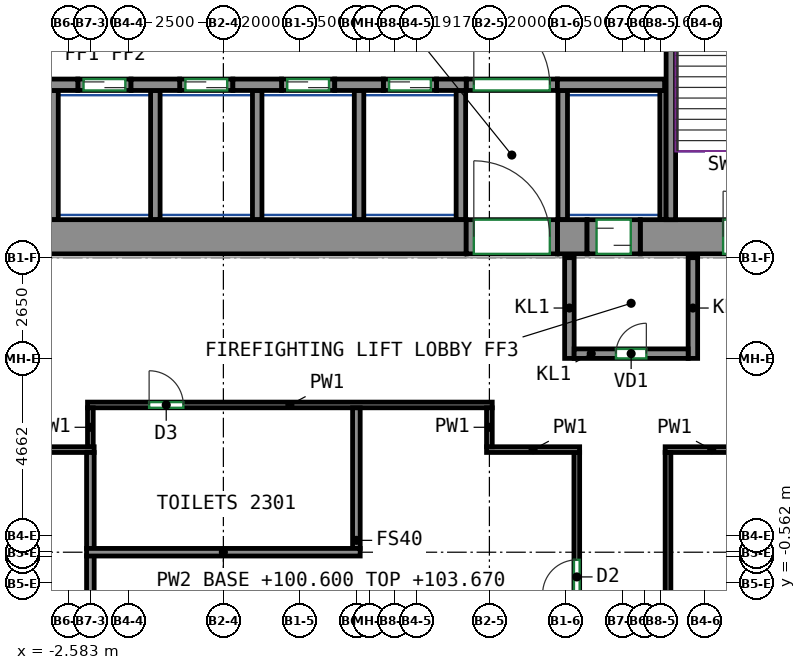
"""IFC4 building model, lengths in metres.
Left out: names, types, materials, properties, quantities, classifications, styles, units other than length and angle.
Written with IfcOpenShell. Run it as: python <this file> out.ifc"""

import sys

from ifc_helpers import new_model, si_unit, direction, frame, frame_2d, origin, place, context, subcontext, project, spatial, rectangle, extrude, source, transform, mapped, element, fill, save


model = new_model("IFC4")
c1 = context("Model", 3, precision=1e-05, world=origin(), true_north=direction((0.0, 1.0)))
c2 = subcontext(c1, "Body", "Model", "MODEL_VIEW")
j1 = project(units=[si_unit("LENGTHUNIT", "METRE"), si_unit("PLANEANGLEUNIT", "RADIAN")], contexts=[c1])
p1 = place(None, origin())
s1 = spatial("IfcSite", under=j1, at=p1, CompositionType="ELEMENT")
p2 = place(p1, origin())
s2 = spatial("IfcBuilding", under=s1, at=p2, CompositionType="ELEMENT")
p3 = place(p2, frame((0.0, 0.0, 100.6)))
s3 = spatial("IfcBuildingStorey", under=s2, at=p3, CompositionType="ELEMENT", Elevation=100.6)
m1 = source(origin(), c2, "Body", "SweptSolid", [
    extrude(rectangle(XDim=14.18, YDim=0.9, at=frame_2d((7.09, 0.0))), origin(), (0.0, 0.0, 1.0), 3.72),
])
p4 = place(p3, frame((-6.29, 8.55, 0.0), z_axis=(0.0, 0.0, 1.0), x_axis=(1.0, 0.0, 0.0)))
e1 = element("IfcWall", 1, at=p4, inside=s3, PredefinedType="SHEAR", context=c2, shape_type="MappedRepresentation", body=[
    mapped(m1, transform((0.0, 0.0, 0.0))),
])
m2 = source(origin(), c2, "Body", "SweptSolid", [
    extrude(rectangle(XDim=0.78, YDim=0.9, at=frame_2d((0.39, 0.0))), origin(), (0.0, 0.0, 1.0), 3.72),
])
p5 = place(p3, frame((10.29, 8.55, 0.0), z_axis=(0.0, 0.0, 1.0), x_axis=(1.0, 0.0, 0.0)))
e2 = element("IfcWall", 2, at=p5, inside=s3, PredefinedType="SHEAR", context=c2, shape_type="MappedRepresentation", body=[
    mapped(m2, transform((0.0, 0.0, 0.0))),
])
m3 = source(origin(), c2, "Body", "SweptSolid", [
    extrude(rectangle(XDim=5.53, YDim=0.9, at=frame_2d((2.765, 0.0))), origin(), (0.0, 0.0, 1.0), 3.72),
])
p6 = place(p3, frame((12.47, 8.55, 0.0), z_axis=(0.0, 0.0, 1.0), x_axis=(1.0, 0.0, 0.0)))
e3 = element("IfcWall", 3, at=p6, inside=s3, PredefinedType="SHEAR", context=c2, shape_type="MappedRepresentation", body=[
    mapped(m3, transform((0.0, 0.0, 0.0))),
])
p7 = place(p6, frame((2.18, 0.0, 0.0)))
e4 = element("IfcOpeningElement", 4, at=p7, cuts=e3, PredefinedType="OPENING", context=c2, shape_type="SweptSolid", body=[
    extrude(rectangle(XDim=1.2, YDim=2.1, at=frame_2d((0.6, 1.05))), frame((0.0, 0.46, 0.0), z_axis=(0.0, -1.0, 0.0), x_axis=(1.0, 0.0, 0.0)), (0.0, 0.0, 1.0), 0.92),
])
m4 = source(origin(), c2, "Body", "SweptSolid", [
    extrude(rectangle(XDim=7.75, YDim=0.25, at=frame_2d((3.875, 0.0))), origin(), (0.0, 0.0, 1.0), 3.72),
])
p8 = place(p3, frame((13.275, 9.0, 0.0), z_axis=(0.0, 0.0, 1.0), x_axis=(0.0, 1.0, 0.0)))
e5 = element("IfcWall", 5, at=p8, inside=s3, PredefinedType="SHEAR", context=c2, shape_type="MappedRepresentation", body=[
    mapped(m4, transform((0.0, 0.0, 0.0))),
])
m5 = source(origin(), c2, "Body", "SweptSolid", [
    extrude(rectangle(XDim=1.28, YDim=0.3, at=frame_2d((0.64, 0.0))), origin(), (0.0, 0.0, 1.0), 3.72),
])
for number, where, z_axis, x_axis in (
    (6, (-3.61, 12.55, 0.0), (0.0, 0.0, 1.0), (1.0, 0.0, 0.0)),
    (7, (-0.93, 12.55, 0.0), (0.0, 0.0, 1.0), (1.0, 0.0, 0.0)),
    (8, (1.75, 12.55, 0.0), (0.0, 0.0, 1.0), (1.0, 0.0, 0.0)),
    (9, (4.43, 12.55, 0.0), (0.0, 0.0, 1.0), (1.0, 0.0, 0.0)),
):
    element("IfcWall", number, at=place(p3, frame(where, z_axis=z_axis, x_axis=x_axis)), inside=s3, PredefinedType="SHEAR", context=c2, shape_type="MappedRepresentation", body=[
        mapped(m5, transform((0.0, 0.0, 0.0))),
    ])
m6 = source(origin(), c2, "Body", "SweptSolid", [
    extrude(rectangle(XDim=0.78, YDim=0.3, at=frame_2d((0.39, 0.0))), origin(), (0.0, 0.0, 1.0), 3.72),
])
p9 = place(p3, frame((7.11, 12.55, 0.0), z_axis=(0.0, 0.0, 1.0), x_axis=(1.0, 0.0, 0.0)))
e10 = element("IfcWall", 10, at=p9, inside=s3, PredefinedType="SHEAR", context=c2, shape_type="MappedRepresentation", body=[
    mapped(m6, transform((0.0, 0.0, 0.0))),
])
m7 = source(origin(), c2, "Body", "SweptSolid", [
    extrude(rectangle(XDim=2.82, YDim=0.3, at=frame_2d((1.41, 0.0))), origin(), (0.0, 0.0, 1.0), 3.72),
])
p10 = place(p3, frame((10.29, 12.55, 0.0), z_axis=(0.0, 0.0, 1.0), x_axis=(1.0, 0.0, 0.0)))
e11 = element("IfcWall", 11, at=p10, inside=s3, PredefinedType="SHEAR", context=c2, shape_type="MappedRepresentation", body=[
    mapped(m7, transform((0.0, 0.0, 0.0))),
])
m8 = source(origin(), c2, "Body", "SweptSolid", [
    extrude(rectangle(XDim=1.4, YDim=0.3, at=frame_2d((0.7, 0.0))), origin(), (0.0, 0.0, 1.0), 3.72),
])
p11 = place(p3, frame((-2.33, 12.55, 0.0), z_axis=(0.0, 0.0, 1.0), x_axis=(1.0, 0.0, 0.0)))
e12 = element("IfcWall", 12, at=p11, inside=s3, PredefinedType="PARTITIONING", context=c2, shape_type="MappedRepresentation", body=[
    mapped(m8, transform((0.0, 0.0, 0.0))),
])
p12 = place(p11, frame((0.15, 0.0, 0.0)))
e13 = element("IfcOpeningElement", 13, at=p12, cuts=e12, PredefinedType="OPENING", context=c2, shape_type="SweptSolid", body=[
    extrude(rectangle(XDim=1.1, YDim=2.1, at=frame_2d((0.55, 1.05))), frame((0.0, 0.16, 0.0), z_axis=(0.0, -1.0, 0.0), x_axis=(1.0, 0.0, 0.0)), (0.0, 0.0, 1.0), 0.32),
])
m9 = source(origin(), c2, "Body", "SweptSolid", [
    extrude(rectangle(XDim=1.4, YDim=0.3, at=frame_2d((0.7, 0.0))), origin(), (0.0, 0.0, 1.0), 3.72),
])
p13 = place(p3, frame((0.35, 12.55, 0.0), z_axis=(0.0, 0.0, 1.0), x_axis=(1.0, 0.0, 0.0)))
e14 = element("IfcWall", 14, at=p13, inside=s3, PredefinedType="PARTITIONING", context=c2, shape_type="MappedRepresentation", body=[
    mapped(m9, transform((0.0, 0.0, 0.0))),
])
p14 = place(p13, frame((0.15, 0.0, 0.0)))
e15 = element("IfcOpeningElement", 15, at=p14, cuts=e14, PredefinedType="OPENING", context=c2, shape_type="SweptSolid", body=[
    extrude(rectangle(XDim=1.1, YDim=2.1, at=frame_2d((0.55, 1.05))), frame((0.0, 0.16, 0.0), z_axis=(0.0, -1.0, 0.0), x_axis=(1.0, 0.0, 0.0)), (0.0, 0.0, 1.0), 0.32),
])
p15 = place(p3, frame((3.03, 12.55, 0.0), z_axis=(0.0, 0.0, 1.0), x_axis=(1.0, 0.0, 0.0)))
e16 = element("IfcWall", 16, at=p15, inside=s3, PredefinedType="PARTITIONING", context=c2, shape_type="MappedRepresentation", body=[
    mapped(m9, transform((0.0, 0.0, 0.0))),
])
p16 = place(p15, frame((0.15, 0.0, 0.0)))
e17 = element("IfcOpeningElement", 17, at=p16, cuts=e16, PredefinedType="OPENING", context=c2, shape_type="SweptSolid", body=[
    extrude(rectangle(XDim=1.1, YDim=2.1, at=frame_2d((0.55, 1.05))), frame((0.0, 0.16, 0.0), z_axis=(0.0, -1.0, 0.0), x_axis=(1.0, 0.0, 0.0)), (0.0, 0.0, 1.0), 0.32),
])
p17 = place(p3, frame((5.71, 12.55, 0.0), z_axis=(0.0, 0.0, 1.0), x_axis=(1.0, 0.0, 0.0)))
e18 = element("IfcWall", 18, at=p17, inside=s3, PredefinedType="PARTITIONING", context=c2, shape_type="MappedRepresentation", body=[
    mapped(m8, transform((0.0, 0.0, 0.0))),
])
p18 = place(p17, frame((0.15, 0.0, 0.0)))
e19 = element("IfcOpeningElement", 19, at=p18, cuts=e18, PredefinedType="OPENING", context=c2, shape_type="SweptSolid", body=[
    extrude(rectangle(XDim=1.1, YDim=2.1, at=frame_2d((0.55, 1.05))), frame((0.0, 0.16, 0.0), z_axis=(0.0, -1.0, 0.0), x_axis=(1.0, 0.0, 0.0)), (0.0, 0.0, 1.0), 0.32),
])
m10 = source(origin(), c2, "Body", "SweptSolid", [
    extrude(rectangle(XDim=2.4, YDim=0.3, at=frame_2d((1.2, 0.0))), origin(), (0.0, 0.0, 1.0), 3.72),
])
p19 = place(p3, frame((7.89, 12.55, 0.0), z_axis=(0.0, 0.0, 1.0), x_axis=(1.0, 0.0, 0.0)))
e20 = element("IfcWall", 20, at=p19, inside=s3, PredefinedType="PARTITIONING", context=c2, shape_type="MappedRepresentation", body=[
    mapped(m10, transform((0.0, 0.0, 0.0))),
])
p20 = place(p19, frame((0.2, 0.0, 0.0)))
e21 = element("IfcOpeningElement", 21, at=p20, cuts=e20, PredefinedType="OPENING", context=c2, shape_type="SweptSolid", body=[
    extrude(rectangle(XDim=2.0, YDim=2.1, at=frame_2d((1.0, 1.05))), frame((0.0, 0.16, 0.0), z_axis=(0.0, -1.0, 0.0), x_axis=(1.0, 0.0, 0.0)), (0.0, 0.0, 1.0), 0.32),
])
m11 = source(origin(), c2, "Body", "SweptSolid", [
    extrude(rectangle(XDim=2.65, YDim=0.25, at=frame_2d((1.325, 0.0))), origin(), (0.0, 0.0, 1.0), 3.72),
])
for number, where, z_axis, x_axis in (
    (22, (10.605, 5.35, 0.0), (0.0, 0.0, 1.0), (0.0, 1.0, 0.0)),
    (23, (13.855, 5.35, 0.0), (0.0, 0.0, 1.0), (0.0, 1.0, 0.0)),
):
    element("IfcWall", number, at=place(p3, frame(where, z_axis=z_axis, x_axis=x_axis)), inside=s3, PredefinedType="PARTITIONING", context=c2, shape_type="MappedRepresentation", body=[
        mapped(m11, transform((0.0, 0.0, 0.0))),
    ])
m12 = source(origin(), c2, "Body", "SweptSolid", [
    extrude(rectangle(XDim=3.0, YDim=0.25, at=frame_2d((1.5, 0.0))), origin(), (0.0, 0.0, 1.0), 3.72),
])
p21 = place(p3, frame((10.73, 5.475, 0.0), z_axis=(0.0, 0.0, 1.0), x_axis=(1.0, 0.0, 0.0)))
e24 = element("IfcWall", 24, at=p21, inside=s3, PredefinedType="PARTITIONING", context=c2, shape_type="MappedRepresentation", body=[
    mapped(m12, transform((0.0, 0.0, 0.0))),
])
p22 = place(p21, frame((1.1, 0.0, 0.0)))
e25 = element("IfcOpeningElement", 25, at=p22, cuts=e24, PredefinedType="OPENING", context=c2, shape_type="SweptSolid", body=[
    extrude(rectangle(XDim=0.8, YDim=2.0, at=frame_2d((0.4, 1.0))), frame((0.0, 0.135, 0.0), z_axis=(0.0, -1.0, 0.0), x_axis=(1.0, 0.0, 0.0)), (0.0, 0.0, 1.0), 0.27),
])
m13 = source(origin(), c2, "Body", "SweptSolid", [
    extrude(rectangle(XDim=3.4, YDim=0.25, at=frame_2d((1.7, 0.0))), origin(), (0.0, 0.0, 1.0), 3.72),
])
p23 = place(p3, frame((10.43, 9.0, 0.0), z_axis=(0.0, 0.0, 1.0), x_axis=(0.0, 1.0, 0.0)))
e26 = element("IfcWall", 26, at=p23, inside=s3, PredefinedType="PARTITIONING", context=c2, shape_type="MappedRepresentation", body=[
    mapped(m13, transform((0.0, 0.0, 0.0))),
])
m14 = source(origin(), c2, "Body", "SweptSolid", [
    extrude(rectangle(XDim=3.4, YDim=0.165, at=frame_2d((1.7, 0.0))), origin(), (0.0, 0.0, 1.0), 3.72),
])
p24 = place(p3, frame((13.067, 9.0, 0.0), z_axis=(0.0, 0.0, 1.0), x_axis=(0.0, 1.0, 0.0)))
e27 = element("IfcWall", 27, at=p24, inside=s3, PredefinedType="PARTITIONING", context=c2, shape_type="MappedRepresentation", body=[
    mapped(m14, transform((0.0, 0.0, 0.0))),
])
for number, where, z_axis, x_axis in (
    (28, (2.39, 9.0, 0.0), (0.0, 0.0, 1.0), (0.0, 1.0, 0.0)),
    (29, (5.07, 9.0, 0.0), (0.0, 0.0, 1.0), (0.0, 1.0, 0.0)),
    (30, (7.75, 9.0, 0.0), (0.0, 0.0, 1.0), (0.0, 1.0, 0.0)),
    (31, (-0.29, 9.0, 0.0), (0.0, 0.0, 1.0), (0.0, 1.0, 0.0)),
    (32, (-2.97, 9.0, 0.0), (0.0, 0.0, 1.0), (0.0, 1.0, 0.0)),
):
    element("IfcWall", number, at=place(p3, frame(where, z_axis=z_axis, x_axis=x_axis)), inside=s3, PredefinedType="PARTITIONING", context=c2, shape_type="MappedRepresentation", body=[
        mapped(m13, transform((0.0, 0.0, 0.0))),
    ])
m15 = source(origin(), c2, "Body", "SweptSolid", [
    extrude(rectangle(XDim=2.4, YDim=0.9, at=frame_2d((1.2, 0.0))), origin(), (0.0, 0.0, 1.0), 2.7),
])
p25 = place(p3, frame((7.89, 8.55, 0.0), z_axis=(0.0, 0.0, 1.0), x_axis=(1.0, 0.0, 0.0)))
e33 = element("IfcWall", 33, at=p25, inside=s3, PredefinedType="PARTITIONING", context=c2, shape_type="MappedRepresentation", body=[
    mapped(m15, transform((0.0, 0.0, 0.0))),
])
p26 = place(p25, frame((0.2, 0.0, 0.0)))
e34 = element("IfcOpeningElement", 34, at=p26, cuts=e33, PredefinedType="OPENING", context=c2, shape_type="SweptSolid", body=[
    extrude(rectangle(XDim=2.0, YDim=2.1, at=frame_2d((1.0, 1.05))), frame((0.0, 0.46, 0.0), z_axis=(0.0, -1.0, 0.0), x_axis=(1.0, 0.0, 0.0)), (0.0, 0.0, 1.0), 0.92),
])
m16 = source(origin(), c2, "Body", "SweptSolid", [
    extrude(rectangle(XDim=1.4, YDim=0.9, at=frame_2d((0.7, 0.0))), origin(), (0.0, 0.0, 1.0), 2.7),
])
p27 = place(p3, frame((11.07, 8.55, 0.0), z_axis=(0.0, 0.0, 1.0), x_axis=(1.0, 0.0, 0.0)))
e35 = element("IfcWall", 35, at=p27, inside=s3, PredefinedType="PARTITIONING", context=c2, shape_type="MappedRepresentation", body=[
    mapped(m16, transform((0.0, 0.0, 0.0))),
])
p28 = place(p27, frame((0.25, 0.0, 0.0)))
e36 = element("IfcOpeningElement", 36, at=p28, cuts=e35, PredefinedType="OPENING", context=c2, shape_type="SweptSolid", body=[
    extrude(rectangle(XDim=0.9, YDim=2.1, at=frame_2d((0.45, 1.05))), frame((0.0, 0.46, 0.0), z_axis=(0.0, -1.0, 0.0), x_axis=(1.0, 0.0, 0.0)), (0.0, 0.0, 1.0), 0.92),
])
p29 = place(p3, frame((-13.735, 2.95, 0.0), z_axis=(0.0, 0.0, 1.0), x_axis=(1.0, 0.0, 0.0)))
e37 = element("IfcWall", 37, at=p29, inside=s3, PredefinedType="PARTITIONING", context=c2, shape_type="SweptSolid", body=[
    extrude(rectangle(XDim=11.835, YDim=0.15, at=frame_2d((5.917, 0.0))), origin(), (0.0, 0.0, 1.0), 3.72),
])
p30 = place(p29, frame((7.63, 0.0, 0.0)))
e38 = element("IfcOpeningElement", 38, at=p30, cuts=e37, PredefinedType="OPENING", context=c2, shape_type="SweptSolid", body=[
    extrude(rectangle(XDim=0.9, YDim=2.1, at=frame_2d((0.45, 1.05))), frame((0.0, 0.085, 0.0), z_axis=(0.0, -1.0, 0.0), x_axis=(1.0, 0.0, 0.0)), (0.0, 0.0, 1.0), 0.17),
])
p31 = place(p3, frame((-2.075, 4.125, 0.0), z_axis=(0.0, 0.0, 1.0), x_axis=(1.0, 0.0, 0.0)))
e39 = element("IfcWall", 39, at=p31, inside=s3, PredefinedType="PARTITIONING", context=c2, shape_type="SweptSolid", body=[
    extrude(rectangle(XDim=10.65, YDim=0.15, at=frame_2d((5.325, 0.0))), origin(), (0.0, 0.0, 1.0), 3.72),
])
p32 = place(p31, frame((1.621, 0.0, 0.0)))
e40 = element("IfcOpeningElement", 40, at=p32, cuts=e39, PredefinedType="OPENING", context=c2, shape_type="SweptSolid", body=[
    extrude(rectangle(XDim=0.9, YDim=2.1, at=frame_2d((0.45, 1.05))), frame((0.0, 0.085, 0.0), z_axis=(0.0, -1.0, 0.0), x_axis=(1.0, 0.0, 0.0)), (0.0, 0.0, 1.0), 0.17),
])
p33 = place(p3, frame((-2.0, 3.025, 0.0), z_axis=(0.0, 0.0, 1.0), x_axis=(0.0, 1.0, 0.0)))
e41 = element("IfcWall", 41, at=p33, inside=s3, PredefinedType="PARTITIONING", context=c2, shape_type="SweptSolid", body=[
    extrude(rectangle(XDim=1.025, YDim=0.15, at=frame_2d((0.513, 0.0))), origin(), (0.0, 0.0, 1.0), 3.72),
])
p34 = place(p3, frame((10.8, -7.41, 0.0), z_axis=(0.0, 0.0, 1.0), x_axis=(0.0, 1.0, 0.0)))
e42 = element("IfcWall", 42, at=p34, inside=s3, PredefinedType="PARTITIONING", context=c2, shape_type="SweptSolid", body=[
    extrude(rectangle(XDim=10.285, YDim=0.15, at=frame_2d((5.143, 0.0))), origin(), (0.0, 0.0, 1.0), 3.72),
])
p35 = place(p34, frame((6.56, 0.0, 0.0)))
e43 = element("IfcOpeningElement", 43, at=p35, cuts=e42, PredefinedType="OPENING", context=c2, shape_type="SweptSolid", body=[
    extrude(rectangle(XDim=0.9, YDim=2.1, at=frame_2d((0.45, 1.05))), frame((0.0, 0.085, 0.0), z_axis=(0.0, -1.0, 0.0), x_axis=(1.0, 0.0, 0.0)), (0.0, 0.0, 1.0), 0.17),
])
p36 = place(p3, frame((8.425, 2.95, 0.0), z_axis=(0.0, 0.0, 1.0), x_axis=(1.0, 0.0, 0.0)))
e44 = element("IfcWall", 44, at=p36, inside=s3, PredefinedType="PARTITIONING", context=c2, shape_type="SweptSolid", body=[
    extrude(rectangle(XDim=2.45, YDim=0.15, at=frame_2d((1.225, 0.0))), origin(), (0.0, 0.0, 1.0), 3.72),
])
p37 = place(p3, frame((8.5, 4.05, 0.0), z_axis=(0.0, 0.0, 1.0), x_axis=(0.0, -1.0, 0.0)))
e45 = element("IfcWall", 45, at=p37, inside=s3, PredefinedType="PARTITIONING", context=c2, shape_type="SweptSolid", body=[
    extrude(rectangle(XDim=1.025, YDim=0.15, at=frame_2d((0.513, 0.0))), origin(), (0.0, 0.0, 1.0), 3.72),
])
p38 = place(p3, frame((13.125, 2.95, 0.0), z_axis=(0.0, 0.0, 1.0), x_axis=(1.0, 0.0, 0.0)))
e46 = element("IfcWall", 46, at=p38, inside=s3, PredefinedType="PARTITIONING", context=c2, shape_type="SweptSolid", body=[
    extrude(rectangle(XDim=2.45, YDim=0.15, at=frame_2d((1.225, 0.0))), origin(), (0.0, 0.0, 1.0), 3.72),
])
p39 = place(p3, frame((13.2, -7.41, 0.0), z_axis=(0.0, 0.0, 1.0), x_axis=(0.0, 1.0, 0.0)))
e47 = element("IfcWall", 47, at=p39, inside=s3, PredefinedType="PARTITIONING", context=c2, shape_type="SweptSolid", body=[
    extrude(rectangle(XDim=10.285, YDim=0.15, at=frame_2d((5.143, 0.0))), origin(), (0.0, 0.0, 1.0), 3.72),
])
p40 = place(p3, frame((-2.0, 0.34, 0.0), z_axis=(0.0, 0.0, 1.0), x_axis=(0.0, 1.0, 0.0)))
e48 = element("IfcWall", 48, at=p40, inside=s3, PredefinedType="PARTITIONING", context=c2, shape_type="SweptSolid", body=[
    extrude(rectangle(XDim=2.534, YDim=0.2, at=frame_2d((1.267, 0.0))), origin(), (0.0, 0.0, 1.0), 3.72),
])
p41 = place(p3, frame((-2.0, -3.525, 0.0), z_axis=(0.0, 0.0, 1.0), x_axis=(0.0, 1.0, 0.0)))
e49 = element("IfcWall", 49, at=p41, inside=s3, PredefinedType="PARTITIONING", context=c2, shape_type="SweptSolid", body=[
    extrude(rectangle(XDim=3.685, YDim=0.2, at=frame_2d((1.842, 0.0))), origin(), (0.0, 0.0, 1.0), 3.72),
])
p42 = place(p3, frame((5.0, 0.35, 0.0), z_axis=(0.0, 0.0, 1.0), x_axis=(0.0, 1.0, 0.0)))
e50 = element("IfcWall", 50, at=p42, inside=s3, PredefinedType="PARTITIONING", context=c2, shape_type="SweptSolid", body=[
    extrude(rectangle(XDim=3.699, YDim=0.2, at=frame_2d((1.85, 0.0))), origin(), (0.0, 0.0, 1.0), 3.72),
])
p43 = place(p3, frame((-2.1, 0.25, 0.0), z_axis=(0.0, 0.0, 1.0), x_axis=(1.0, 0.0, 0.0)))
e51 = element("IfcWall", 51, at=p43, inside=s3, PredefinedType="PARTITIONING", context=c2, shape_type="SweptSolid", body=[
    extrude(rectangle(XDim=7.2, YDim=0.2, at=frame_2d((3.6, 0.0))), origin(), (0.0, 0.0, 1.0), 3.07),
])
p44 = place(p20, origin())
e52 = element("IfcDoor", 52, at=p44, inside=s3, OperationType="DOUBLE_DOOR_SINGLE_SWING", PredefinedType="DOOR", context=c2, shape_type="SweptSolid", body=[
    extrude(rectangle(XDim=2.0, YDim=2.1, at=frame_2d((1.0, 1.05))), frame((0.0, 0.025, 0.0), z_axis=(0.0, -1.0, 0.0), x_axis=(1.0, 0.0, 0.0)), (0.0, 0.0, 1.0), 0.05),
])
fill(e21, e52)
p45 = place(p26, origin())
e53 = element("IfcDoor", 53, at=p45, inside=s3, OperationType="DOUBLE_DOOR_SINGLE_SWING", PredefinedType="DOOR", context=c2, shape_type="SweptSolid", body=[
    extrude(rectangle(XDim=2.0, YDim=2.1, at=frame_2d((1.0, 1.05))), frame((0.0, 0.355, 0.0), z_axis=(0.0, -1.0, 0.0), x_axis=(1.0, 0.0, 0.0)), (0.0, 0.0, 1.0), 0.05),
])
fill(e34, e53)
p46 = place(p22, origin())
e54 = element("IfcDoor", 54, at=p46, inside=s3, OperationType="SINGLE_SWING_RIGHT", PredefinedType="DOOR", context=c2, shape_type="SweptSolid", body=[
    extrude(rectangle(XDim=0.8, YDim=2.0, at=frame_2d((0.4, 1.0))), frame((0.0, 0.025, 0.0), z_axis=(0.0, -1.0, 0.0), x_axis=(1.0, 0.0, 0.0)), (0.0, 0.0, 1.0), 0.05),
])
fill(e25, e54)
p47 = place(p28, origin())
e55 = element("IfcDoor", 55, at=p47, inside=s3, OperationType="SLIDING_TO_LEFT", PredefinedType="DOOR", context=c2, shape_type="SweptSolid", body=[
    extrude(rectangle(XDim=0.9, YDim=2.1, at=frame_2d((0.45, 1.05))), frame((0.0, 0.355, 0.0), z_axis=(0.0, -1.0, 0.0), x_axis=(1.0, 0.0, 0.0)), (0.0, 0.0, 1.0), 0.05),
])
fill(e36, e55)
p48 = place(p12, origin())
e56 = element("IfcDoor", 56, at=p48, inside=s3, OperationType="DOUBLE_DOOR_SLIDING", PredefinedType="DOOR", context=c2, shape_type="SweptSolid", body=[
    extrude(rectangle(XDim=1.1, YDim=2.1, at=frame_2d((0.55, 1.05))), frame((0.0, 0.025, 0.0), z_axis=(0.0, -1.0, 0.0), x_axis=(1.0, 0.0, 0.0)), (0.0, 0.0, 1.0), 0.05),
])
fill(e13, e56)
p49 = place(p14, origin())
e57 = element("IfcDoor", 57, at=p49, inside=s3, OperationType="DOUBLE_DOOR_SLIDING", PredefinedType="DOOR", context=c2, shape_type="SweptSolid", body=[
    extrude(rectangle(XDim=1.1, YDim=2.1, at=frame_2d((0.55, 1.05))), frame((0.0, 0.025, 0.0), z_axis=(0.0, -1.0, 0.0), x_axis=(1.0, 0.0, 0.0)), (0.0, 0.0, 1.0), 0.05),
])
fill(e15, e57)
p50 = place(p16, origin())
e58 = element("IfcDoor", 58, at=p50, inside=s3, OperationType="DOUBLE_DOOR_SLIDING", PredefinedType="DOOR", context=c2, shape_type="SweptSolid", body=[
    extrude(rectangle(XDim=1.1, YDim=2.1, at=frame_2d((0.55, 1.05))), frame((0.0, 0.025, 0.0), z_axis=(0.0, -1.0, 0.0), x_axis=(1.0, 0.0, 0.0)), (0.0, 0.0, 1.0), 0.05),
])
fill(e17, e58)
p51 = place(p18, origin())
e59 = element("IfcDoor", 59, at=p51, inside=s3, OperationType="DOUBLE_DOOR_SLIDING", PredefinedType="DOOR", context=c2, shape_type="SweptSolid", body=[
    extrude(rectangle(XDim=1.1, YDim=2.1, at=frame_2d((0.55, 1.05))), frame((0.0, 0.025, 0.0), z_axis=(0.0, -1.0, 0.0), x_axis=(1.0, 0.0, 0.0)), (0.0, 0.0, 1.0), 0.05),
])
fill(e19, e59)
p52 = place(p7, origin())
e60 = element("IfcDoor", 60, at=p52, inside=s3, OperationType="DOUBLE_DOOR_SINGLE_SWING", PredefinedType="DOOR", context=c2, shape_type="SweptSolid", body=[
    extrude(rectangle(XDim=1.2, YDim=2.1, at=frame_2d((0.6, 1.05))), frame((0.0, 0.355, 0.0), z_axis=(0.0, -1.0, 0.0), x_axis=(1.0, 0.0, 0.0)), (0.0, 0.0, 1.0), 0.05),
])
fill(e4, e60)
p53 = place(p35, origin())
e61 = element("IfcDoor", 61, at=p53, inside=s3, OperationType="SINGLE_SWING_LEFT", PredefinedType="DOOR", context=c2, shape_type="SweptSolid", body=[
    extrude(rectangle(XDim=0.9, YDim=2.1, at=frame_2d((0.45, 1.05))), frame((0.0, 0.025, 0.0), z_axis=(0.0, -1.0, 0.0), x_axis=(1.0, 0.0, 0.0)), (0.0, 0.0, 1.0), 0.05),
])
fill(e43, e61)
p54 = place(p32, origin())
e62 = element("IfcDoor", 62, at=p54, inside=s3, OperationType="SINGLE_SWING_LEFT", PredefinedType="DOOR", context=c2, shape_type="SweptSolid", body=[
    extrude(rectangle(XDim=0.9, YDim=2.1, at=frame_2d((0.45, 1.05))), frame((0.0, 0.025, 0.0), z_axis=(0.0, -1.0, 0.0), x_axis=(1.0, 0.0, 0.0)), (0.0, 0.0, 1.0), 0.05),
])
fill(e40, e62)
save(model, sys.argv[1])
